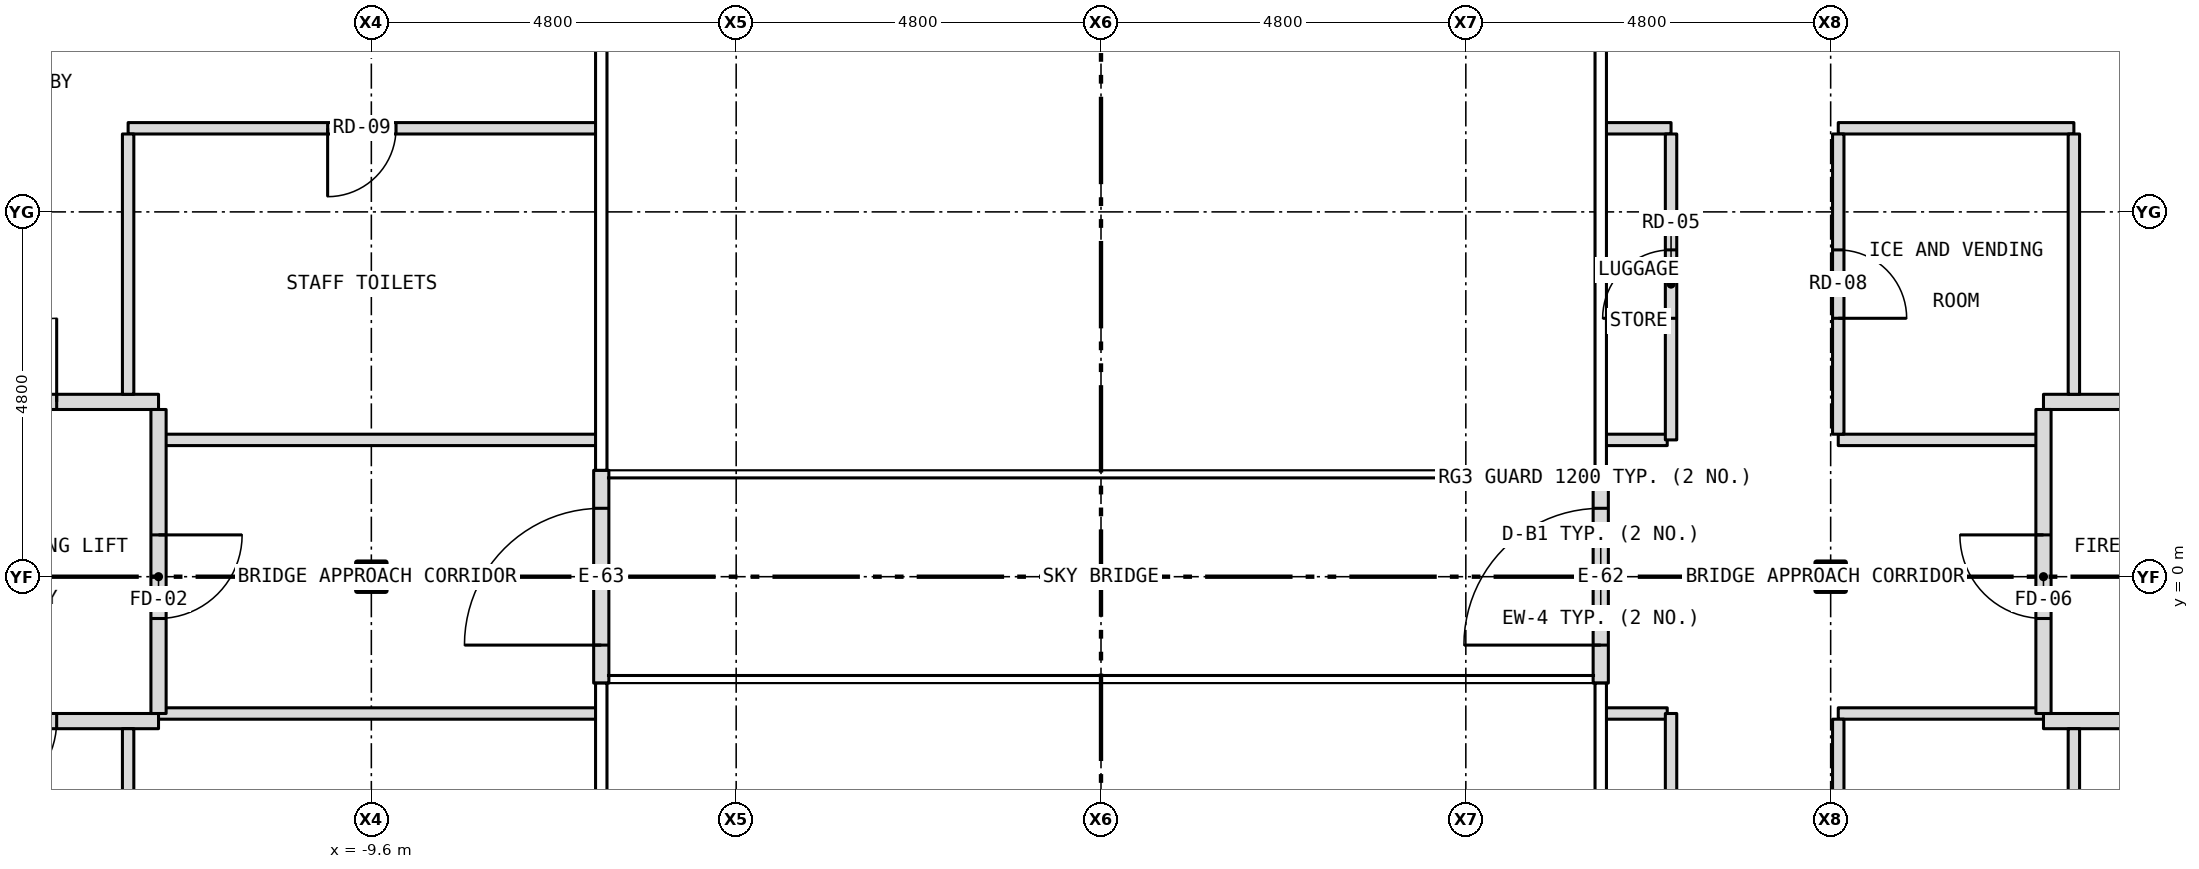
"""IFC4 building model, lengths in metres.
Left out: names, types, materials, properties, quantities, classifications, styles, units other than length and angle.
Written with IfcOpenShell. Run it as: python <this file> out.ifc"""

import sys

from ifc_helpers import new_model, si_unit, direction, frame, frame_2d, origin, origin_2d, place, context, subcontext, project, spatial, rectangle, i_section, extrude, element, fill, save


model = new_model("IFC4")
c1 = context("Model", 3, precision=1e-05, world=origin(), true_north=direction((0.0, 1.0)))
c2 = subcontext(c1, "Body", "Model", "MODEL_VIEW")
j1 = project(units=[si_unit("LENGTHUNIT", "METRE"), si_unit("PLANEANGLEUNIT", "RADIAN")], contexts=[c1])
p1 = place(None, origin())
s1 = spatial("IfcSite", under=j1, at=p1, CompositionType="ELEMENT")
p2 = place(p1, origin())
s2 = spatial("IfcBuilding", under=s1, at=p2, CompositionType="ELEMENT")
p3 = place(p2, frame((0.0, 0.0, 229.5)))
s3 = spatial("IfcBuildingStorey", under=s2, at=p3, CompositionType="ELEMENT", Elevation=229.5)
for number, where, z_axis, x_axis in (
    (1, (-9.6, 0.0, -0.15), (0.0, 0.0, 1.0), (1.0, 0.0, 0.0)),
    (2, (9.6, 0.0, -0.15), (0.0, 0.0, 1.0), (1.0, 0.0, 0.0)),
):
    element("IfcColumn", number, at=place(p3, frame(where, z_axis=z_axis, x_axis=x_axis)), inside=s3, PredefinedType="COLUMN", context=c2, shape_type="SweptSolid", body=[
        extrude(i_section(OverallWidth=0.373, OverallDepth=0.373, WebThickness=0.016, FlangeThickness=0.026, at=origin_2d()), origin(), (0.0, 0.0, 1.0), 3.5),
    ])
p4 = place(p3, frame((6.575, -1.4, 0.0), z_axis=(0.0, 0.0, 1.0), x_axis=(0.0, 1.0, 0.0)))
e3 = element("IfcWall", 3, at=p4, inside=s3, PredefinedType="SOLIDWALL", context=c2, shape_type="SweptSolid", body=[
    extrude(rectangle(XDim=2.8, YDim=0.2, at=frame_2d((1.4, 0.0))), origin(), (0.0, 0.0, 1.0), 3.5),
])
p5 = place(p4, frame((0.5, 0.0, 0.0)))
e4 = element("IfcOpeningElement", 4, at=p5, cuts=e3, PredefinedType="OPENING", context=c2, shape_type="SweptSolid", body=[
    extrude(rectangle(XDim=1.8, YDim=2.1, at=frame_2d((0.9, 1.05))), frame((0.0, 0.112, 0.0), z_axis=(0.0, -1.0, 0.0), x_axis=(1.0, 0.0, 0.0)), (0.0, 0.0, 1.0), 0.224),
])
p6 = place(p3, frame((-6.575, -1.4, 0.0), z_axis=(0.0, 0.0, 1.0), x_axis=(0.0, 1.0, 0.0)))
e5 = element("IfcWall", 5, at=p6, inside=s3, PredefinedType="SOLIDWALL", context=c2, shape_type="SweptSolid", body=[
    extrude(rectangle(XDim=2.8, YDim=0.2, at=frame_2d((1.4, 0.0))), origin(), (0.0, 0.0, 1.0), 3.5),
])
p7 = place(p6, frame((0.5, 0.0, 0.0)))
e6 = element("IfcOpeningElement", 6, at=p7, cuts=e5, PredefinedType="OPENING", context=c2, shape_type="SweptSolid", body=[
    extrude(rectangle(XDim=1.8, YDim=2.1, at=frame_2d((0.9, 1.05))), frame((0.0, 0.112, 0.0), z_axis=(0.0, -1.0, 0.0), x_axis=(1.0, 0.0, 0.0)), (0.0, 0.0, 1.0), 0.224),
])
p8 = place(p3, frame((-15.68, -1.9, 0.0), z_axis=(0.0, 0.0, 1.0), x_axis=(1.0, 0.0, 0.0)))
e7 = element("IfcWall", 7, at=p8, inside=s3, PredefinedType="PARTITIONING", context=c2, shape_type="SweptSolid", body=[
    extrude(rectangle(XDim=3.28, YDim=0.2, at=frame_2d((1.64, 0.0))), origin(), (0.0, 0.0, 1.0), 3.35),
])
p9 = place(p8, frame((0.84, 0.0, 0.0)))
e8 = element("IfcOpeningElement", 8, at=p9, cuts=e7, PredefinedType="OPENING", context=c2, shape_type="SweptSolid", body=[
    extrude(rectangle(XDim=1.1, YDim=2.1, at=frame_2d((0.55, 1.05))), frame((0.0, 0.112, 0.0), z_axis=(0.0, -1.0, 0.0), x_axis=(1.0, 0.0, 0.0)), (0.0, 0.0, 1.0), 0.224),
])
p10 = place(p3, frame((12.4, -1.9, 0.0), z_axis=(0.0, 0.0, 1.0), x_axis=(1.0, 0.0, 0.0)))
e9 = element("IfcWall", 9, at=p10, inside=s3, PredefinedType="PARTITIONING", context=c2, shape_type="SweptSolid", body=[
    extrude(rectangle(XDim=3.28, YDim=0.2, at=frame_2d((1.64, 0.0))), origin(), (0.0, 0.0, 1.0), 3.35),
])
p11 = place(p10, frame((1.34, 0.0, 0.0)))
e10 = element("IfcOpeningElement", 10, at=p11, cuts=e9, PredefinedType="OPENING", context=c2, shape_type="SweptSolid", body=[
    extrude(rectangle(XDim=1.1, YDim=2.1, at=frame_2d((0.55, 1.05))), frame((0.0, 0.112, 0.0), z_axis=(0.0, -1.0, 0.0), x_axis=(1.0, 0.0, 0.0)), (0.0, 0.0, 1.0), 0.224),
])
p12 = place(p3, frame((-12.4, -1.8, 0.0), z_axis=(0.0, 0.0, 1.0), x_axis=(1.0, 0.0, 0.0)))
e11 = element("IfcWall", 11, at=p12, inside=s3, PredefinedType="PARTITIONING", context=c2, shape_type="SweptSolid", body=[
    extrude(rectangle(XDim=5.78, YDim=0.15, at=frame_2d((2.89, 0.0))), origin(), (0.0, 0.0, 1.0), 3.35),
])
p13 = place(p3, frame((6.62, -1.8, 0.0), z_axis=(0.0, 0.0, 1.0), x_axis=(1.0, 0.0, 0.0)))
e12 = element("IfcWall", 12, at=p13, inside=s3, PredefinedType="PARTITIONING", context=c2, shape_type="SweptSolid", body=[
    extrude(rectangle(XDim=0.83, YDim=0.15, at=frame_2d((0.415, 0.0))), origin(), (0.0, 0.0, 1.0), 3.35),
])
p14 = place(p3, frame((9.7, -1.8, 0.0), z_axis=(0.0, 0.0, 1.0), x_axis=(1.0, 0.0, 0.0)))
e13 = element("IfcWall", 13, at=p14, inside=s3, PredefinedType="PARTITIONING", context=c2, shape_type="SweptSolid", body=[
    extrude(rectangle(XDim=2.7, YDim=0.15, at=frame_2d((1.35, 0.0))), origin(), (0.0, 0.0, 1.0), 3.35),
])
p15 = place(p3, frame((-12.4, 1.8, 0.0), z_axis=(0.0, 0.0, 1.0), x_axis=(1.0, 0.0, 0.0)))
e14 = element("IfcWall", 14, at=p15, inside=s3, PredefinedType="PARTITIONING", context=c2, shape_type="SweptSolid", body=[
    extrude(rectangle(XDim=5.78, YDim=0.15, at=frame_2d((2.89, 0.0))), origin(), (0.0, 0.0, 1.0), 3.35),
])
p16 = place(p3, frame((6.62, 1.8, 0.0), z_axis=(0.0, 0.0, 1.0), x_axis=(1.0, 0.0, 0.0)))
e15 = element("IfcWall", 15, at=p16, inside=s3, PredefinedType="PARTITIONING", context=c2, shape_type="SweptSolid", body=[
    extrude(rectangle(XDim=0.83, YDim=0.15, at=frame_2d((0.415, 0.0))), origin(), (0.0, 0.0, 1.0), 3.35),
])
p17 = place(p3, frame((9.7, 1.8, 0.0), z_axis=(0.0, 0.0, 1.0), x_axis=(1.0, 0.0, 0.0)))
e16 = element("IfcWall", 16, at=p17, inside=s3, PredefinedType="PARTITIONING", context=c2, shape_type="SweptSolid", body=[
    extrude(rectangle(XDim=2.7, YDim=0.15, at=frame_2d((1.35, 0.0))), origin(), (0.0, 0.0, 1.0), 3.35),
])
p18 = place(p3, frame((-15.68, 2.3, 0.0), z_axis=(0.0, 0.0, 1.0), x_axis=(1.0, 0.0, 0.0)))
e17 = element("IfcWall", 17, at=p18, inside=s3, PredefinedType="PARTITIONING", context=c2, shape_type="SweptSolid", body=[
    extrude(rectangle(XDim=3.28, YDim=0.2, at=frame_2d((1.64, 0.0))), origin(), (0.0, 0.0, 1.0), 3.35),
])
p19 = place(p18, frame((0.84, 0.0, 0.0)))
e18 = element("IfcOpeningElement", 18, at=p19, cuts=e17, PredefinedType="OPENING", context=c2, shape_type="SweptSolid", body=[
    extrude(rectangle(XDim=1.1, YDim=2.1, at=frame_2d((0.55, 1.05))), frame((0.0, 0.112, 0.0), z_axis=(0.0, -1.0, 0.0), x_axis=(1.0, 0.0, 0.0)), (0.0, 0.0, 1.0), 0.224),
])
p20 = place(p3, frame((12.4, 2.3, 0.0), z_axis=(0.0, 0.0, 1.0), x_axis=(1.0, 0.0, 0.0)))
e19 = element("IfcWall", 19, at=p20, inside=s3, PredefinedType="PARTITIONING", context=c2, shape_type="SweptSolid", body=[
    extrude(rectangle(XDim=3.28, YDim=0.2, at=frame_2d((1.64, 0.0))), origin(), (0.0, 0.0, 1.0), 3.35),
])
p21 = place(p20, frame((1.34, 0.0, 0.0)))
e20 = element("IfcOpeningElement", 20, at=p21, cuts=e19, PredefinedType="OPENING", context=c2, shape_type="SweptSolid", body=[
    extrude(rectangle(XDim=1.1, YDim=2.1, at=frame_2d((0.55, 1.05))), frame((0.0, 0.112, 0.0), z_axis=(0.0, -1.0, 0.0), x_axis=(1.0, 0.0, 0.0)), (0.0, 0.0, 1.0), 0.224),
])
p22 = place(p3, frame((-12.8, 5.9, 0.0), z_axis=(0.0, 0.0, 1.0), x_axis=(1.0, 0.0, 0.0)))
e21 = element("IfcWall", 21, at=p22, inside=s3, PredefinedType="PARTITIONING", context=c2, shape_type="SweptSolid", body=[
    extrude(rectangle(XDim=6.18, YDim=0.15, at=frame_2d((3.09, 0.0))), origin(), (0.0, 0.0, 1.0), 3.35),
])
p23 = place(p22, frame((2.625, 0.0, 0.0)))
e22 = element("IfcOpeningElement", 22, at=p23, cuts=e21, PredefinedType="OPENING", context=c2, shape_type="SweptSolid", body=[
    extrude(rectangle(XDim=0.9, YDim=2.1, at=frame_2d((0.45, 1.05))), frame((0.0, 0.087, 0.0), z_axis=(0.0, -1.0, 0.0), x_axis=(1.0, 0.0, 0.0)), (0.0, 0.0, 1.0), 0.174),
])
p24 = place(p3, frame((6.62, 5.9, 0.0), z_axis=(0.0, 0.0, 1.0), x_axis=(1.0, 0.0, 0.0)))
e23 = element("IfcWall", 23, at=p24, inside=s3, PredefinedType="PARTITIONING", context=c2, shape_type="SweptSolid", body=[
    extrude(rectangle(XDim=0.88, YDim=0.15, at=frame_2d((0.44, 0.0))), origin(), (0.0, 0.0, 1.0), 3.35),
])
p25 = place(p3, frame((9.7, 5.9, 0.0), z_axis=(0.0, 0.0, 1.0), x_axis=(1.0, 0.0, 0.0)))
e24 = element("IfcWall", 24, at=p25, inside=s3, PredefinedType="PARTITIONING", context=c2, shape_type="SweptSolid", body=[
    extrude(rectangle(XDim=3.1, YDim=0.15, at=frame_2d((1.55, 0.0))), origin(), (0.0, 0.0, 1.0), 3.35),
])
p26 = place(p3, frame((-12.8, -10.525, 0.0), z_axis=(0.0, 0.0, 1.0), x_axis=(0.0, 1.0, 0.0)))
e25 = element("IfcWall", 25, at=p26, inside=s3, PredefinedType="PARTITIONING", context=c2, shape_type="SweptSolid", body=[
    extrude(rectangle(XDim=8.525, YDim=0.15, at=frame_2d((4.262, 0.0))), origin(), (0.0, 0.0, 1.0), 3.35),
])
p27 = place(p26, frame((3.825, 0.0, 0.0)))
e26 = element("IfcOpeningElement", 26, at=p27, cuts=e25, PredefinedType="OPENING", context=c2, shape_type="SweptSolid", body=[
    extrude(rectangle(XDim=0.9, YDim=2.1, at=frame_2d((0.45, 1.05))), frame((0.0, 0.087, 0.0), z_axis=(0.0, -1.0, 0.0), x_axis=(1.0, 0.0, 0.0)), (0.0, 0.0, 1.0), 0.174),
])
p28 = place(p3, frame((-12.8, 2.4, 0.0), z_axis=(0.0, 0.0, 1.0), x_axis=(0.0, 1.0, 0.0)))
e27 = element("IfcWall", 27, at=p28, inside=s3, PredefinedType="PARTITIONING", context=c2, shape_type="SweptSolid", body=[
    extrude(rectangle(XDim=3.425, YDim=0.15, at=frame_2d((1.712, 0.0))), origin(), (0.0, 0.0, 1.0), 3.35),
])
p29 = place(p3, frame((-12.4, -1.8, 0.0), z_axis=(0.0, 0.0, 1.0), x_axis=(0.0, 1.0, 0.0)))
e28 = element("IfcWall", 28, at=p29, inside=s3, PredefinedType="PARTITIONING", context=c2, shape_type="SweptSolid", body=[
    extrude(rectangle(XDim=4.0, YDim=0.2, at=frame_2d((2.0, 0.0))), origin(), (0.0, 0.0, 1.0), 3.35),
])
p30 = place(p29, frame((1.25, 0.0, 0.0)))
e29 = element("IfcOpeningElement", 29, at=p30, cuts=e28, PredefinedType="OPENING", context=c2, shape_type="SweptSolid", body=[
    extrude(rectangle(XDim=1.1, YDim=2.1, at=frame_2d((0.55, 1.05))), frame((0.0, 0.112, 0.0), z_axis=(0.0, -1.0, 0.0), x_axis=(1.0, 0.0, 0.0)), (0.0, 0.0, 1.0), 0.224),
])
p31 = place(p3, frame((7.5, -10.525, 0.0), z_axis=(0.0, 0.0, 1.0), x_axis=(0.0, 1.0, 0.0)))
e30 = element("IfcWall", 30, at=p31, inside=s3, PredefinedType="PARTITIONING", context=c2, shape_type="SweptSolid", body=[
    extrude(rectangle(XDim=8.725, YDim=0.15, at=frame_2d((4.362, 0.0))), origin(), (0.0, 0.0, 1.0), 3.35),
])
p32 = place(p31, frame((3.875, 0.0, 0.0)))
e31 = element("IfcOpeningElement", 31, at=p32, cuts=e30, PredefinedType="OPENING", context=c2, shape_type="SweptSolid", body=[
    extrude(rectangle(XDim=0.9, YDim=2.1, at=frame_2d((0.45, 1.05))), frame((0.0, 0.087, 0.0), z_axis=(0.0, -1.0, 0.0), x_axis=(1.0, 0.0, 0.0)), (0.0, 0.0, 1.0), 0.174),
])
p33 = place(p3, frame((7.5, 1.8, 0.0), z_axis=(0.0, 0.0, 1.0), x_axis=(0.0, 1.0, 0.0)))
e32 = element("IfcWall", 32, at=p33, inside=s3, PredefinedType="PARTITIONING", context=c2, shape_type="SweptSolid", body=[
    extrude(rectangle(XDim=4.025, YDim=0.15, at=frame_2d((2.012, 0.0))), origin(), (0.0, 0.0, 1.0), 3.35),
])
p34 = place(p33, frame((1.6, 0.0, 0.0)))
e33 = element("IfcOpeningElement", 33, at=p34, cuts=e32, PredefinedType="OPENING", context=c2, shape_type="SweptSolid", body=[
    extrude(rectangle(XDim=0.9, YDim=2.1, at=frame_2d((0.45, 1.05))), frame((0.0, 0.087, 0.0), z_axis=(0.0, -1.0, 0.0), x_axis=(1.0, 0.0, 0.0)), (0.0, 0.0, 1.0), 0.174),
])
p35 = place(p3, frame((9.7, -9.413, 0.0), z_axis=(0.0, 0.0, 1.0), x_axis=(0.0, 1.0, 0.0)))
e34 = element("IfcWall", 34, at=p35, inside=s3, PredefinedType="PARTITIONING", context=c2, shape_type="SweptSolid", body=[
    extrude(rectangle(XDim=7.538, YDim=0.15, at=frame_2d((3.769, 0.0))), origin(), (0.0, 0.0, 1.0), 2.728),
])
p36 = place(p35, frame((2.763, 0.0, 0.0)))
e35 = element("IfcOpeningElement", 35, at=p36, cuts=e34, PredefinedType="OPENING", context=c2, shape_type="SweptSolid", body=[
    extrude(rectangle(XDim=0.9, YDim=2.1, at=frame_2d((0.45, 1.05))), frame((0.0, 0.087, 0.0), z_axis=(0.0, -1.0, 0.0), x_axis=(1.0, 0.0, 0.0)), (0.0, 0.0, 1.0), 0.174),
])
p37 = place(p3, frame((9.7, 1.875, 0.0), z_axis=(0.0, 0.0, 1.0), x_axis=(0.0, 1.0, 0.0)))
e36 = element("IfcWall", 36, at=p37, inside=s3, PredefinedType="PARTITIONING", context=c2, shape_type="SweptSolid", body=[
    extrude(rectangle(XDim=3.95, YDim=0.15, at=frame_2d((1.975, 0.0))), origin(), (0.0, 0.0, 1.0), 2.728),
])
p38 = place(p37, frame((1.525, 0.0, 0.0)))
e37 = element("IfcOpeningElement", 37, at=p38, cuts=e36, PredefinedType="OPENING", context=c2, shape_type="SweptSolid", body=[
    extrude(rectangle(XDim=0.9, YDim=2.1, at=frame_2d((0.45, 1.05))), frame((0.0, 0.087, 0.0), z_axis=(0.0, -1.0, 0.0), x_axis=(1.0, 0.0, 0.0)), (0.0, 0.0, 1.0), 0.174),
])
p39 = place(p3, frame((12.4, -1.8, 0.0), z_axis=(0.0, 0.0, 1.0), x_axis=(0.0, 1.0, 0.0)))
e38 = element("IfcWall", 38, at=p39, inside=s3, PredefinedType="PARTITIONING", context=c2, shape_type="SweptSolid", body=[
    extrude(rectangle(XDim=4.0, YDim=0.2, at=frame_2d((2.0, 0.0))), origin(), (0.0, 0.0, 1.0), 3.35),
])
p40 = place(p39, frame((1.25, 0.0, 0.0)))
e39 = element("IfcOpeningElement", 39, at=p40, cuts=e38, PredefinedType="OPENING", context=c2, shape_type="SweptSolid", body=[
    extrude(rectangle(XDim=1.1, YDim=2.1, at=frame_2d((0.55, 1.05))), frame((0.0, 0.112, 0.0), z_axis=(0.0, -1.0, 0.0), x_axis=(1.0, 0.0, 0.0)), (0.0, 0.0, 1.0), 0.224),
])
p41 = place(p3, frame((12.8, -10.525, 0.0), z_axis=(0.0, 0.0, 1.0), x_axis=(0.0, 1.0, 0.0)))
e40 = element("IfcWall", 40, at=p41, inside=s3, PredefinedType="PARTITIONING", context=c2, shape_type="SweptSolid", body=[
    extrude(rectangle(XDim=8.525, YDim=0.15, at=frame_2d((4.262, 0.0))), origin(), (0.0, 0.0, 1.0), 3.35),
])
p42 = place(p3, frame((12.8, 2.4, 0.0), z_axis=(0.0, 0.0, 1.0), x_axis=(0.0, 1.0, 0.0)))
e41 = element("IfcWall", 41, at=p42, inside=s3, PredefinedType="PARTITIONING", context=c2, shape_type="SweptSolid", body=[
    extrude(rectangle(XDim=3.425, YDim=0.15, at=frame_2d((1.712, 0.0))), origin(), (0.0, 0.0, 1.0), 3.35),
])
p43 = place(p5, origin())
e42 = element("IfcDoor", 42, at=p43, inside=s3, OperationType="DOUBLE_DOOR_DOUBLE_SWING", PredefinedType="DOOR", context=c2, shape_type="SweptSolid", body=[
    extrude(rectangle(XDim=1.8, YDim=2.1, at=frame_2d((0.9, 1.05))), frame((0.0, 0.025, 0.0), z_axis=(0.0, -1.0, 0.0), x_axis=(1.0, 0.0, 0.0)), (0.0, 0.0, 1.0), 0.05),
])
fill(e4, e42)
p44 = place(p7, origin())
e43 = element("IfcDoor", 43, at=p44, inside=s3, OperationType="DOUBLE_DOOR_DOUBLE_SWING", PredefinedType="DOOR", context=c2, shape_type="SweptSolid", body=[
    extrude(rectangle(XDim=1.8, YDim=2.1, at=frame_2d((0.9, 1.05))), frame((0.0, 0.025, 0.0), z_axis=(0.0, -1.0, 0.0), x_axis=(1.0, 0.0, 0.0)), (0.0, 0.0, 1.0), 0.05),
])
fill(e6, e43)
p45 = place(p30, origin())
e44 = element("IfcDoor", 44, at=p45, inside=s3, OperationType="SINGLE_SWING_RIGHT", PredefinedType="DOOR", context=c2, shape_type="SweptSolid", body=[
    extrude(rectangle(XDim=1.1, YDim=2.1, at=frame_2d((0.55, 1.05))), frame((0.0, 0.025, 0.0), z_axis=(0.0, -1.0, 0.0), x_axis=(1.0, 0.0, 0.0)), (0.0, 0.0, 1.0), 0.05),
])
fill(e29, e44)
p46 = place(p9, origin())
e45 = element("IfcDoor", 45, at=p46, inside=s3, OperationType="SINGLE_SWING_LEFT", PredefinedType="DOOR", context=c2, shape_type="SweptSolid", body=[
    extrude(rectangle(XDim=1.1, YDim=2.1, at=frame_2d((0.55, 1.05))), frame((0.0, 0.025, 0.0), z_axis=(0.0, -1.0, 0.0), x_axis=(1.0, 0.0, 0.0)), (0.0, 0.0, 1.0), 0.05),
])
fill(e8, e45)
p47 = place(p19, origin())
e46 = element("IfcDoor", 46, at=p47, inside=s3, OperationType="SINGLE_SWING_RIGHT", PredefinedType="DOOR", context=c2, shape_type="SweptSolid", body=[
    extrude(rectangle(XDim=1.1, YDim=2.1, at=frame_2d((0.55, 1.05))), frame((0.0, 0.025, 0.0), z_axis=(0.0, -1.0, 0.0), x_axis=(1.0, 0.0, 0.0)), (0.0, 0.0, 1.0), 0.05),
])
fill(e18, e46)
p48 = place(p40, origin())
e47 = element("IfcDoor", 47, at=p48, inside=s3, OperationType="SINGLE_SWING_RIGHT", PredefinedType="DOOR", context=c2, shape_type="SweptSolid", body=[
    extrude(rectangle(XDim=1.1, YDim=2.1, at=frame_2d((0.55, 1.05))), frame((0.0, 0.025, 0.0), z_axis=(0.0, -1.0, 0.0), x_axis=(1.0, 0.0, 0.0)), (0.0, 0.0, 1.0), 0.05),
])
fill(e39, e47)
p49 = place(p34, origin())
e48 = element("IfcDoor", 48, at=p49, inside=s3, OperationType="SINGLE_SWING_LEFT", PredefinedType="DOOR", context=c2, shape_type="SweptSolid", body=[
    extrude(rectangle(XDim=0.9, YDim=2.1, at=frame_2d((0.45, 1.05))), frame((0.0, 0.025, 0.0), z_axis=(0.0, -1.0, 0.0), x_axis=(1.0, 0.0, 0.0)), (0.0, 0.0, 1.0), 0.05),
])
fill(e33, e48)
p50 = place(p38, origin())
e49 = element("IfcDoor", 49, at=p50, inside=s3, OperationType="SINGLE_SWING_LEFT", PredefinedType="DOOR", context=c2, shape_type="SweptSolid", body=[
    extrude(rectangle(XDim=0.9, YDim=2.1, at=frame_2d((0.45, 1.05))), frame((0.0, 0.025, 0.0), z_axis=(0.0, -1.0, 0.0), x_axis=(1.0, 0.0, 0.0)), (0.0, 0.0, 1.0), 0.05),
])
fill(e37, e49)
p51 = place(p23, origin())
e50 = element("IfcDoor", 50, at=p51, inside=s3, OperationType="SINGLE_SWING_LEFT", PredefinedType="DOOR", context=c2, shape_type="SweptSolid", body=[
    extrude(rectangle(XDim=0.9, YDim=2.1, at=frame_2d((0.45, 1.05))), frame((0.0, 0.025, 0.0), z_axis=(0.0, -1.0, 0.0), x_axis=(1.0, 0.0, 0.0)), (0.0, 0.0, 1.0), 0.05),
])
fill(e22, e50)
save(model, sys.argv[1])
